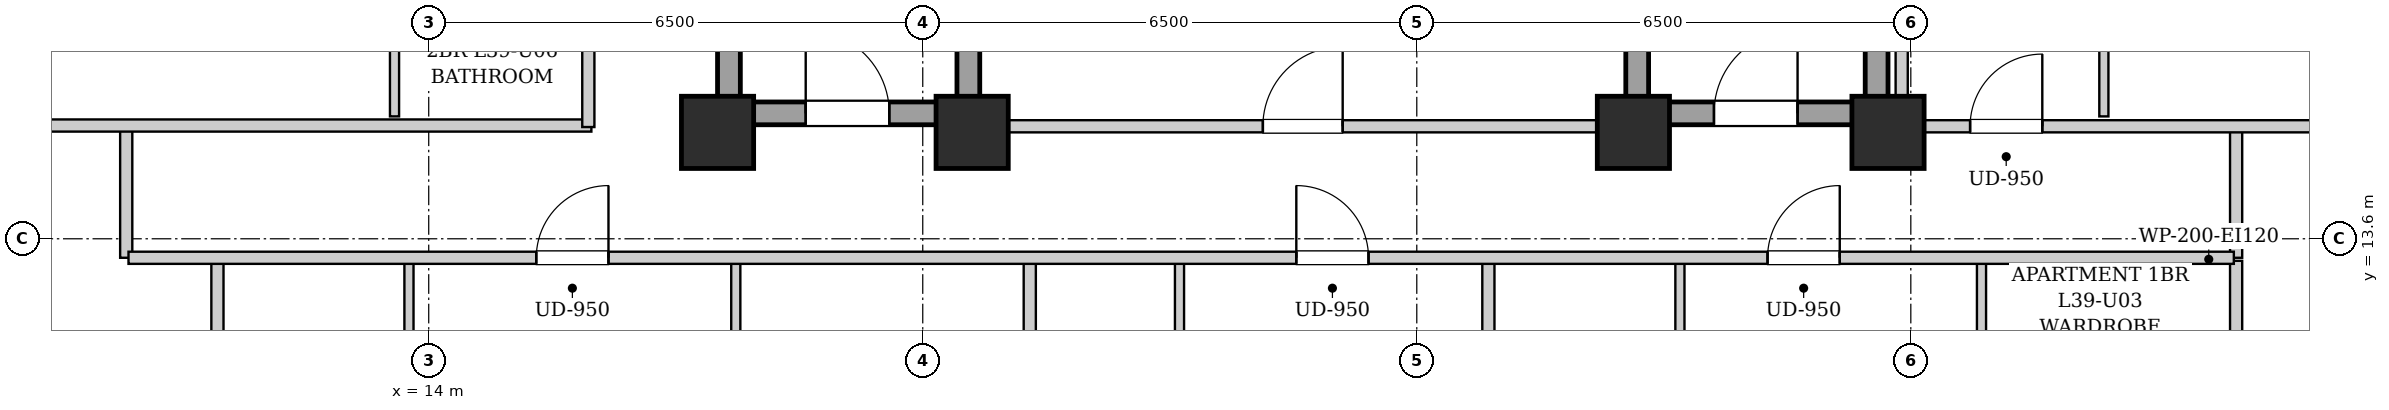
"""IFC4 building model, lengths in metres.
Left out: names, types, materials, properties, quantities, classifications, styles, units other than length and angle.
Written with IfcOpenShell. Run it as: python <this file> out.ifc"""

import sys

from ifc_helpers import new_model, si_unit, direction, frame, frame_2d, origin, origin_2d, place, context, subcontext, project, spatial, rectangle, extrude, element, fill, save


model = new_model("IFC4")
c1 = context("Model", 3, precision=1e-05, world=origin(), true_north=direction((0.0, 1.0)))
c2 = subcontext(c1, "Body", "Model", "MODEL_VIEW")
j1 = project(units=[si_unit("LENGTHUNIT", "METRE"), si_unit("PLANEANGLEUNIT", "RADIAN")], contexts=[c1])
p1 = place(None, origin())
s1 = spatial("IfcSite", under=j1, at=p1, CompositionType="ELEMENT")
p2 = place(p1, origin())
s2 = spatial("IfcBuilding", under=s1, at=p2, CompositionType="ELEMENT")
p3 = place(p2, frame((0.0, 0.0, 137.4)))
s3 = spatial("IfcBuildingStorey", under=s2, at=p3, CompositionType="ELEMENT", Elevation=137.4)
for number, where, z_axis, x_axis in (
    (1, (17.8, 15.0, 0.0), (0.0, 0.0, 1.0), (1.0, 0.0, 0.0)),
    (2, (21.15, 15.0, 0.0), (0.0, 0.0, 1.0), (1.0, 0.0, 0.0)),
    (3, (29.85, 15.0, 0.0), (0.0, 0.0, 1.0), (1.0, 0.0, 0.0)),
    (4, (33.2, 15.0, 0.0), (0.0, 0.0, 1.0), (1.0, 0.0, 0.0)),
):
    element("IfcColumn", number, at=place(p3, frame(where, z_axis=z_axis, x_axis=x_axis)), inside=s3, PredefinedType="COLUMN", context=c2, shape_type="SweptSolid", body=[
        extrude(rectangle(XDim=0.95, YDim=0.95, at=origin_2d()), origin(), (0.0, 0.0, 1.0), 3.25),
    ])
for number, where, z_axis, x_axis in (
    (5, (17.95, 15.1, 0.0), (0.0, 0.0, 1.0), (0.0, 1.0, 0.0)),
    (6, (21.1, 15.1, 0.0), (0.0, 0.0, 1.0), (0.0, 1.0, 0.0)),
):
    element("IfcWall", number, at=place(p3, frame(where, z_axis=z_axis, x_axis=x_axis)), inside=s3, PredefinedType="SHEAR", context=c2, shape_type="SweptSolid", body=[
        extrude(rectangle(XDim=9.0, YDim=0.3, at=frame_2d((4.5, 0.0))), origin(), (0.0, 0.0, 1.0), 2.99),
    ])
p4 = place(p3, frame((18.1, 15.25, 0.0), z_axis=(0.0, 0.0, 1.0), x_axis=(1.0, 0.0, 0.0)))
e7 = element("IfcWall", 7, at=p4, inside=s3, PredefinedType="SHEAR", context=c2, shape_type="SweptSolid", body=[
    extrude(rectangle(XDim=2.85, YDim=0.3, at=frame_2d((1.425, 0.0))), origin(), (0.0, 0.0, 1.0), 2.99),
])
p5 = place(p4, frame((0.86, 0.0, 0.0)))
e8 = element("IfcOpeningElement", 8, at=p5, cuts=e7, PredefinedType="OPENING", context=c2, shape_type="SweptSolid", body=[
    extrude(rectangle(XDim=1.1, YDim=2.05, at=frame_2d((0.55, 1.025))), frame((0.0, 0.16, 0.0), z_axis=(0.0, -1.0, 0.0), x_axis=(1.0, 0.0, 0.0)), (0.0, 0.0, 1.0), 0.32),
])
for number, where, z_axis, x_axis in (
    (9, (29.9, 15.1, 0.0), (0.0, 0.0, 1.0), (0.0, 1.0, 0.0)),
    (10, (33.05, 15.1, 0.0), (0.0, 0.0, 1.0), (0.0, 1.0, 0.0)),
):
    element("IfcWall", number, at=place(p3, frame(where, z_axis=z_axis, x_axis=x_axis)), inside=s3, PredefinedType="SHEAR", context=c2, shape_type="SweptSolid", body=[
        extrude(rectangle(XDim=9.0, YDim=0.3, at=frame_2d((4.5, 0.0))), origin(), (0.0, 0.0, 1.0), 2.99),
    ])
p6 = place(p3, frame((30.05, 15.25, 0.0), z_axis=(0.0, 0.0, 1.0), x_axis=(1.0, 0.0, 0.0)))
e11 = element("IfcWall", 11, at=p6, inside=s3, PredefinedType="SHEAR", context=c2, shape_type="SweptSolid", body=[
    extrude(rectangle(XDim=2.85, YDim=0.3, at=frame_2d((1.425, 0.0))), origin(), (0.0, 0.0, 1.0), 2.99),
])
p7 = place(p6, frame((0.86, 0.0, 0.0)))
e12 = element("IfcOpeningElement", 12, at=p7, cuts=e11, PredefinedType="OPENING", context=c2, shape_type="SweptSolid", body=[
    extrude(rectangle(XDim=1.1, YDim=2.05, at=frame_2d((0.55, 1.025))), frame((0.0, 0.16, 0.0), z_axis=(0.0, -1.0, 0.0), x_axis=(1.0, 0.0, 0.0)), (0.0, 0.0, 1.0), 0.32),
])
p8 = place(p3, frame((21.25, 15.08, 0.0), z_axis=(0.0, 0.0, 1.0), x_axis=(1.0, 0.0, 0.0)))
e13 = element("IfcWall", 13, at=p8, inside=s3, PredefinedType="PARTITIONING", context=c2, shape_type="SweptSolid", body=[
    extrude(rectangle(XDim=8.5, YDim=0.16, at=frame_2d((4.25, 0.0))), origin(), (0.0, 0.0, 1.0), 2.426),
])
p9 = place(p8, frame((3.725, 0.0, 0.0)))
e14 = element("IfcOpeningElement", 14, at=p9, cuts=e13, PredefinedType="OPENING", context=c2, shape_type="SweptSolid", body=[
    extrude(rectangle(XDim=1.05, YDim=2.05, at=frame_2d((0.525, 1.025))), frame((0.0, 0.09, 0.0), z_axis=(0.0, -1.0, 0.0), x_axis=(1.0, 0.0, 0.0)), (0.0, 0.0, 1.0), 0.18),
])
for number, where, z_axis, x_axis in (
    (15, (10.02, 13.35, 0.0), (0.0, 0.0, 1.0), (0.0, 1.0, 0.0)),
    (16, (37.78, 13.35, 0.0), (0.0, 0.0, 1.0), (0.0, 1.0, 0.0)),
):
    element("IfcWall", number, at=place(p3, frame(where, z_axis=z_axis, x_axis=x_axis)), inside=s3, PredefinedType="PARTITIONING", context=c2, shape_type="SweptSolid", body=[
        extrude(rectangle(XDim=1.74, YDim=0.16, at=frame_2d((0.87, 0.0))), origin(), (0.0, 0.0, 1.0), 2.99),
    ])
p10 = place(p3, frame((7.78, 15.09, 0.0), z_axis=(0.0, 0.0, 1.0), x_axis=(1.0, 0.0, 0.0)))
e17 = element("IfcWall", 17, at=p10, inside=s3, PredefinedType="PARTITIONING", context=c2, shape_type="SweptSolid", body=[
    extrude(rectangle(XDim=8.36, YDim=0.16, at=frame_2d((4.18, 0.0))), origin(), (0.0, 0.0, 1.0), 2.426),
])
p11 = place(p3, frame((11.22, 4.08, 0.0), z_axis=(0.0, 0.0, 1.0), x_axis=(0.0, 1.0, 0.0)))
e18 = element("IfcWall", 18, at=p11, inside=s3, PredefinedType="PARTITIONING", context=c2, shape_type="SweptSolid", body=[
    extrude(rectangle(XDim=9.23, YDim=0.16, at=frame_2d((4.615, 0.0))), origin(), (0.0, 0.0, 1.0), 2.99),
])
p12 = place(p3, frame((13.74, 10.46, 0.0), z_axis=(0.0, 0.0, 1.0), x_axis=(0.0, 1.0, 0.0)))
e19 = element("IfcWall", 19, at=p12, inside=s3, PredefinedType="PARTITIONING", context=c2, shape_type="SweptSolid", body=[
    extrude(rectangle(XDim=2.85, YDim=0.12, at=frame_2d((1.425, 0.0))), origin(), (0.0, 0.0, 1.0), 2.99),
])
p13 = place(p12, frame((0.995, 0.0, 0.0)))
e20 = element("IfcOpeningElement", 20, at=p13, cuts=e19, PredefinedType="OPENING", context=c2, shape_type="SweptSolid", body=[
    extrude(rectangle(XDim=0.86, YDim=2.05, at=frame_2d((0.43, 1.025))), frame((0.0, 0.07, 0.0), z_axis=(0.0, -1.0, 0.0), x_axis=(1.0, 0.0, 0.0)), (0.0, 0.0, 1.0), 0.14),
])
p14 = place(p3, frame((18.04, 10.46, 0.0), z_axis=(0.0, 0.0, 1.0), x_axis=(0.0, 1.0, 0.0)))
e21 = element("IfcWall", 21, at=p14, inside=s3, PredefinedType="PARTITIONING", context=c2, shape_type="SweptSolid", body=[
    extrude(rectangle(XDim=2.85, YDim=0.12, at=frame_2d((1.425, 0.0))), origin(), (0.0, 0.0, 1.0), 2.99),
])
p15 = place(p14, frame((0.975, 0.0, 0.0)))
e22 = element("IfcOpeningElement", 22, at=p15, cuts=e21, PredefinedType="OPENING", context=c2, shape_type="SweptSolid", body=[
    extrude(rectangle(XDim=0.9, YDim=2.05, at=frame_2d((0.45, 1.025))), frame((0.0, 0.07, 0.0), z_axis=(0.0, -1.0, 0.0), x_axis=(1.0, 0.0, 0.0)), (0.0, 0.0, 1.0), 0.14),
])
p16 = place(p3, frame((21.908, 4.08, 0.0), z_axis=(0.0, 0.0, 1.0), x_axis=(0.0, 1.0, 0.0)))
e23 = element("IfcWall", 23, at=p16, inside=s3, PredefinedType="PARTITIONING", context=c2, shape_type="SweptSolid", body=[
    extrude(rectangle(XDim=9.23, YDim=0.16, at=frame_2d((4.615, 0.0))), origin(), (0.0, 0.0, 1.0), 2.99),
])
p17 = place(p3, frame((23.878, 10.46, 0.0), z_axis=(0.0, 0.0, 1.0), x_axis=(0.0, 1.0, 0.0)))
e24 = element("IfcWall", 24, at=p17, inside=s3, PredefinedType="PARTITIONING", context=c2, shape_type="SweptSolid", body=[
    extrude(rectangle(XDim=2.85, YDim=0.12, at=frame_2d((1.425, 0.0))), origin(), (0.0, 0.0, 1.0), 2.99),
])
p18 = place(p17, frame((0.995, 0.0, 0.0)))
e25 = element("IfcOpeningElement", 25, at=p18, cuts=e24, PredefinedType="OPENING", context=c2, shape_type="SweptSolid", body=[
    extrude(rectangle(XDim=0.86, YDim=2.05, at=frame_2d((0.43, 1.025))), frame((0.0, 0.07, 0.0), z_axis=(0.0, -1.0, 0.0), x_axis=(1.0, 0.0, 0.0)), (0.0, 0.0, 1.0), 0.14),
])
p19 = place(p3, frame((37.78, 10.4, 0.0), z_axis=(0.0, 0.0, 1.0), x_axis=(0.0, 1.0, 0.0)))
e26 = element("IfcWall", 26, at=p19, inside=s3, PredefinedType="PARTITIONING", context=c2, shape_type="SweptSolid", body=[
    extrude(rectangle(XDim=2.91, YDim=0.16, at=frame_2d((1.455, 0.0))), origin(), (0.0, 0.0, 1.0), 2.99),
])
p20 = place(p3, frame((27.942, 4.08, 0.0), z_axis=(0.0, 0.0, 1.0), x_axis=(0.0, 1.0, 0.0)))
e27 = element("IfcWall", 27, at=p20, inside=s3, PredefinedType="PARTITIONING", context=c2, shape_type="SweptSolid", body=[
    extrude(rectangle(XDim=9.23, YDim=0.16, at=frame_2d((4.615, 0.0))), origin(), (0.0, 0.0, 1.0), 2.99),
])
p21 = place(p3, frame((30.462, 10.46, 0.0), z_axis=(0.0, 0.0, 1.0), x_axis=(0.0, 1.0, 0.0)))
e28 = element("IfcWall", 28, at=p21, inside=s3, PredefinedType="PARTITIONING", context=c2, shape_type="SweptSolid", body=[
    extrude(rectangle(XDim=2.85, YDim=0.12, at=frame_2d((1.425, 0.0))), origin(), (0.0, 0.0, 1.0), 2.99),
])
p22 = place(p21, frame((0.995, 0.0, 0.0)))
e29 = element("IfcOpeningElement", 29, at=p22, cuts=e28, PredefinedType="OPENING", context=c2, shape_type="SweptSolid", body=[
    extrude(rectangle(XDim=0.86, YDim=2.05, at=frame_2d((0.43, 1.025))), frame((0.0, 0.07, 0.0), z_axis=(0.0, -1.0, 0.0), x_axis=(1.0, 0.0, 0.0)), (0.0, 0.0, 1.0), 0.14),
])
p23 = place(p3, frame((34.43, 10.46, 0.0), z_axis=(0.0, 0.0, 1.0), x_axis=(0.0, 1.0, 0.0)))
e30 = element("IfcWall", 30, at=p23, inside=s3, PredefinedType="PARTITIONING", context=c2, shape_type="SweptSolid", body=[
    extrude(rectangle(XDim=2.85, YDim=0.12, at=frame_2d((1.425, 0.0))), origin(), (0.0, 0.0, 1.0), 2.99),
])
p24 = place(p23, frame((0.975, 0.0, 0.0)))
e31 = element("IfcOpeningElement", 31, at=p24, cuts=e30, PredefinedType="OPENING", context=c2, shape_type="SweptSolid", body=[
    extrude(rectangle(XDim=0.9, YDim=2.05, at=frame_2d((0.45, 1.025))), frame((0.0, 0.07, 0.0), z_axis=(0.0, -1.0, 0.0), x_axis=(1.0, 0.0, 0.0)), (0.0, 0.0, 1.0), 0.14),
])
p25 = place(p3, frame((13.55, 15.21, 0.0), z_axis=(0.0, 0.0, 1.0), x_axis=(0.0, 1.0, 0.0)))
e32 = element("IfcWall", 32, at=p25, inside=s3, PredefinedType="PARTITIONING", context=c2, shape_type="SweptSolid", body=[
    extrude(rectangle(XDim=2.3, YDim=0.12, at=frame_2d((1.15, 0.0))), origin(), (0.0, 0.0, 1.0), 2.99),
])
p26 = place(p3, frame((33.38, 15.08, 0.0), z_axis=(0.0, 0.0, 1.0), x_axis=(1.0, 0.0, 0.0)))
e33 = element("IfcWall", 33, at=p26, inside=s3, PredefinedType="PARTITIONING", context=c2, shape_type="SweptSolid", body=[
    extrude(rectangle(XDim=6.64, YDim=0.16, at=frame_2d((3.32, 0.0))), origin(), (0.0, 0.0, 1.0), 2.426),
])
p27 = place(p26, frame((0.9, 0.0, 0.0)))
e34 = element("IfcOpeningElement", 34, at=p27, cuts=e33, PredefinedType="OPENING", context=c2, shape_type="SweptSolid", body=[
    extrude(rectangle(XDim=0.95, YDim=2.1, at=frame_2d((0.475, 1.05))), frame((0.0, 0.09, 0.0), z_axis=(0.0, -1.0, 0.0), x_axis=(1.0, 0.0, 0.0)), (0.0, 0.0, 1.0), 0.18),
])
p28 = place(p3, frame((36.04, 15.21, 0.0), z_axis=(0.0, 0.0, 1.0), x_axis=(0.0, 1.0, 0.0)))
e35 = element("IfcWall", 35, at=p28, inside=s3, PredefinedType="PARTITIONING", context=c2, shape_type="SweptSolid", body=[
    extrude(rectangle(XDim=4.5, YDim=0.12, at=frame_2d((2.25, 0.0))), origin(), (0.0, 0.0, 1.0), 2.99),
])
p29 = place(p28, frame((1.8, 0.0, 0.0)))
e36 = element("IfcOpeningElement", 36, at=p29, cuts=e35, PredefinedType="OPENING", context=c2, shape_type="SweptSolid", body=[
    extrude(rectangle(XDim=0.9, YDim=2.05, at=frame_2d((0.45, 1.025))), frame((0.0, 0.07, 0.0), z_axis=(0.0, -1.0, 0.0), x_axis=(1.0, 0.0, 0.0)), (0.0, 0.0, 1.0), 0.14),
])
p30 = place(p3, frame((10.05, 13.35, 0.0), z_axis=(0.0, 0.0, 1.0), x_axis=(1.0, 0.0, 0.0)))
e37 = element("IfcWall", 37, at=p30, inside=s3, PredefinedType="PARTITIONING", context=c2, shape_type="SweptSolid", body=[
    extrude(rectangle(XDim=27.7, YDim=0.16, at=frame_2d((13.85, 0.0))), origin(), (0.0, 0.0, 1.0), 2.99),
])
p31 = place(p30, frame((5.365, 0.0, 0.0)))
e38 = element("IfcOpeningElement", 38, at=p31, cuts=e37, PredefinedType="OPENING", context=c2, shape_type="SweptSolid", body=[
    extrude(rectangle(XDim=0.95, YDim=2.1, at=frame_2d((0.475, 1.05))), frame((0.0, 0.09, 0.0), z_axis=(0.0, -1.0, 0.0), x_axis=(1.0, 0.0, 0.0)), (0.0, 0.0, 1.0), 0.18),
])
p32 = place(p30, frame((15.365, 0.0, 0.0)))
e39 = element("IfcOpeningElement", 39, at=p32, cuts=e37, PredefinedType="OPENING", context=c2, shape_type="SweptSolid", body=[
    extrude(rectangle(XDim=0.95, YDim=2.1, at=frame_2d((0.475, 1.05))), frame((0.0, 0.09, 0.0), z_axis=(0.0, -1.0, 0.0), x_axis=(1.0, 0.0, 0.0)), (0.0, 0.0, 1.0), 0.18),
])
p33 = place(p30, frame((21.565, 0.0, 0.0)))
e40 = element("IfcOpeningElement", 40, at=p33, cuts=e37, PredefinedType="OPENING", context=c2, shape_type="SweptSolid", body=[
    extrude(rectangle(XDim=0.95, YDim=2.1, at=frame_2d((0.475, 1.05))), frame((0.0, 0.09, 0.0), z_axis=(0.0, -1.0, 0.0), x_axis=(1.0, 0.0, 0.0)), (0.0, 0.0, 1.0), 0.18),
])
p34 = place(p3, frame((16.1, 15.07, 0.0), z_axis=(0.0, 0.0, 1.0), x_axis=(0.0, 1.0, 0.0)))
e41 = element("IfcWall", 41, at=p34, inside=s3, PredefinedType="PARTITIONING", context=c2, shape_type="SweptSolid", body=[
    extrude(rectangle(XDim=13.93, YDim=0.16, at=frame_2d((6.965, 0.0))), origin(), (0.0, 0.0, 1.0), 2.99),
])
p35 = place(p34, frame((4.385, 0.0, 0.0)))
e42 = element("IfcOpeningElement", 42, at=p35, cuts=e41, PredefinedType="OPENING", context=c2, shape_type="SweptSolid", body=[
    extrude(rectangle(XDim=0.95, YDim=2.1, at=frame_2d((0.475, 1.05))), frame((0.0, 0.09, 0.0), z_axis=(0.0, -1.0, 0.0), x_axis=(1.0, 0.0, 0.0)), (0.0, 0.0, 1.0), 0.18),
])
p36 = place(p3, frame((33.38, 15.02, 0.0), z_axis=(0.0, 0.0, 1.0), x_axis=(0.0, 1.0, 0.0)))
e43 = element("IfcWall", 43, at=p36, inside=s3, PredefinedType="PARTITIONING", context=c2, shape_type="SweptSolid", body=[
    extrude(rectangle(XDim=13.98, YDim=0.16, at=frame_2d((6.99, 0.0))), origin(), (0.0, 0.0, 1.0), 2.325),
])
p37 = place(p5, origin())
e44 = element("IfcDoor", 44, at=p37, inside=s3, OperationType="SINGLE_SWING_LEFT", PredefinedType="DOOR", context=c2, shape_type="SweptSolid", body=[
    extrude(rectangle(XDim=1.1, YDim=2.05, at=frame_2d((0.55, 1.025))), frame((0.0, 0.025, 0.0), z_axis=(0.0, -1.0, 0.0), x_axis=(1.0, 0.0, 0.0)), (0.0, 0.0, 1.0), 0.05),
])
fill(e8, e44)
p38 = place(p7, origin())
e45 = element("IfcDoor", 45, at=p38, inside=s3, OperationType="SINGLE_SWING_RIGHT", PredefinedType="DOOR", context=c2, shape_type="SweptSolid", body=[
    extrude(rectangle(XDim=1.1, YDim=2.05, at=frame_2d((0.55, 1.025))), frame((0.0, 0.025, 0.0), z_axis=(0.0, -1.0, 0.0), x_axis=(1.0, 0.0, 0.0)), (0.0, 0.0, 1.0), 0.05),
])
fill(e12, e45)
p39 = place(p9, origin())
e46 = element("IfcDoor", 46, at=p39, inside=s3, OperationType="SINGLE_SWING_RIGHT", PredefinedType="DOOR", context=c2, shape_type="SweptSolid", body=[
    extrude(rectangle(XDim=1.05, YDim=2.05, at=frame_2d((0.525, 1.025))), frame((0.0, 0.025, 0.0), z_axis=(0.0, -1.0, 0.0), x_axis=(1.0, 0.0, 0.0)), (0.0, 0.0, 1.0), 0.05),
])
fill(e14, e46)
p40 = place(p27, origin())
e47 = element("IfcDoor", 47, at=p40, inside=s3, OperationType="SINGLE_SWING_RIGHT", PredefinedType="DOOR", context=c2, shape_type="SweptSolid", body=[
    extrude(rectangle(XDim=0.95, YDim=2.1, at=frame_2d((0.475, 1.05))), frame((0.0, 0.025, 0.0), z_axis=(0.0, -1.0, 0.0), x_axis=(1.0, 0.0, 0.0)), (0.0, 0.0, 1.0), 0.05),
])
fill(e34, e47)
p41 = place(p31, origin())
e48 = element("IfcDoor", 48, at=p41, inside=s3, OperationType="SINGLE_SWING_RIGHT", PredefinedType="DOOR", context=c2, shape_type="SweptSolid", body=[
    extrude(rectangle(XDim=0.95, YDim=2.1, at=frame_2d((0.475, 1.05))), frame((0.0, 0.025, 0.0), z_axis=(0.0, -1.0, 0.0), x_axis=(1.0, 0.0, 0.0)), (0.0, 0.0, 1.0), 0.05),
])
fill(e38, e48)
p42 = place(p32, origin())
e49 = element("IfcDoor", 49, at=p42, inside=s3, OperationType="SINGLE_SWING_LEFT", PredefinedType="DOOR", context=c2, shape_type="SweptSolid", body=[
    extrude(rectangle(XDim=0.95, YDim=2.1, at=frame_2d((0.475, 1.05))), frame((0.0, 0.025, 0.0), z_axis=(0.0, -1.0, 0.0), x_axis=(1.0, 0.0, 0.0)), (0.0, 0.0, 1.0), 0.05),
])
fill(e39, e49)
p43 = place(p33, origin())
e50 = element("IfcDoor", 50, at=p43, inside=s3, OperationType="SINGLE_SWING_RIGHT", PredefinedType="DOOR", context=c2, shape_type="SweptSolid", body=[
    extrude(rectangle(XDim=0.95, YDim=2.1, at=frame_2d((0.475, 1.05))), frame((0.0, 0.025, 0.0), z_axis=(0.0, -1.0, 0.0), x_axis=(1.0, 0.0, 0.0)), (0.0, 0.0, 1.0), 0.05),
])
fill(e40, e50)
save(model, sys.argv[1])
